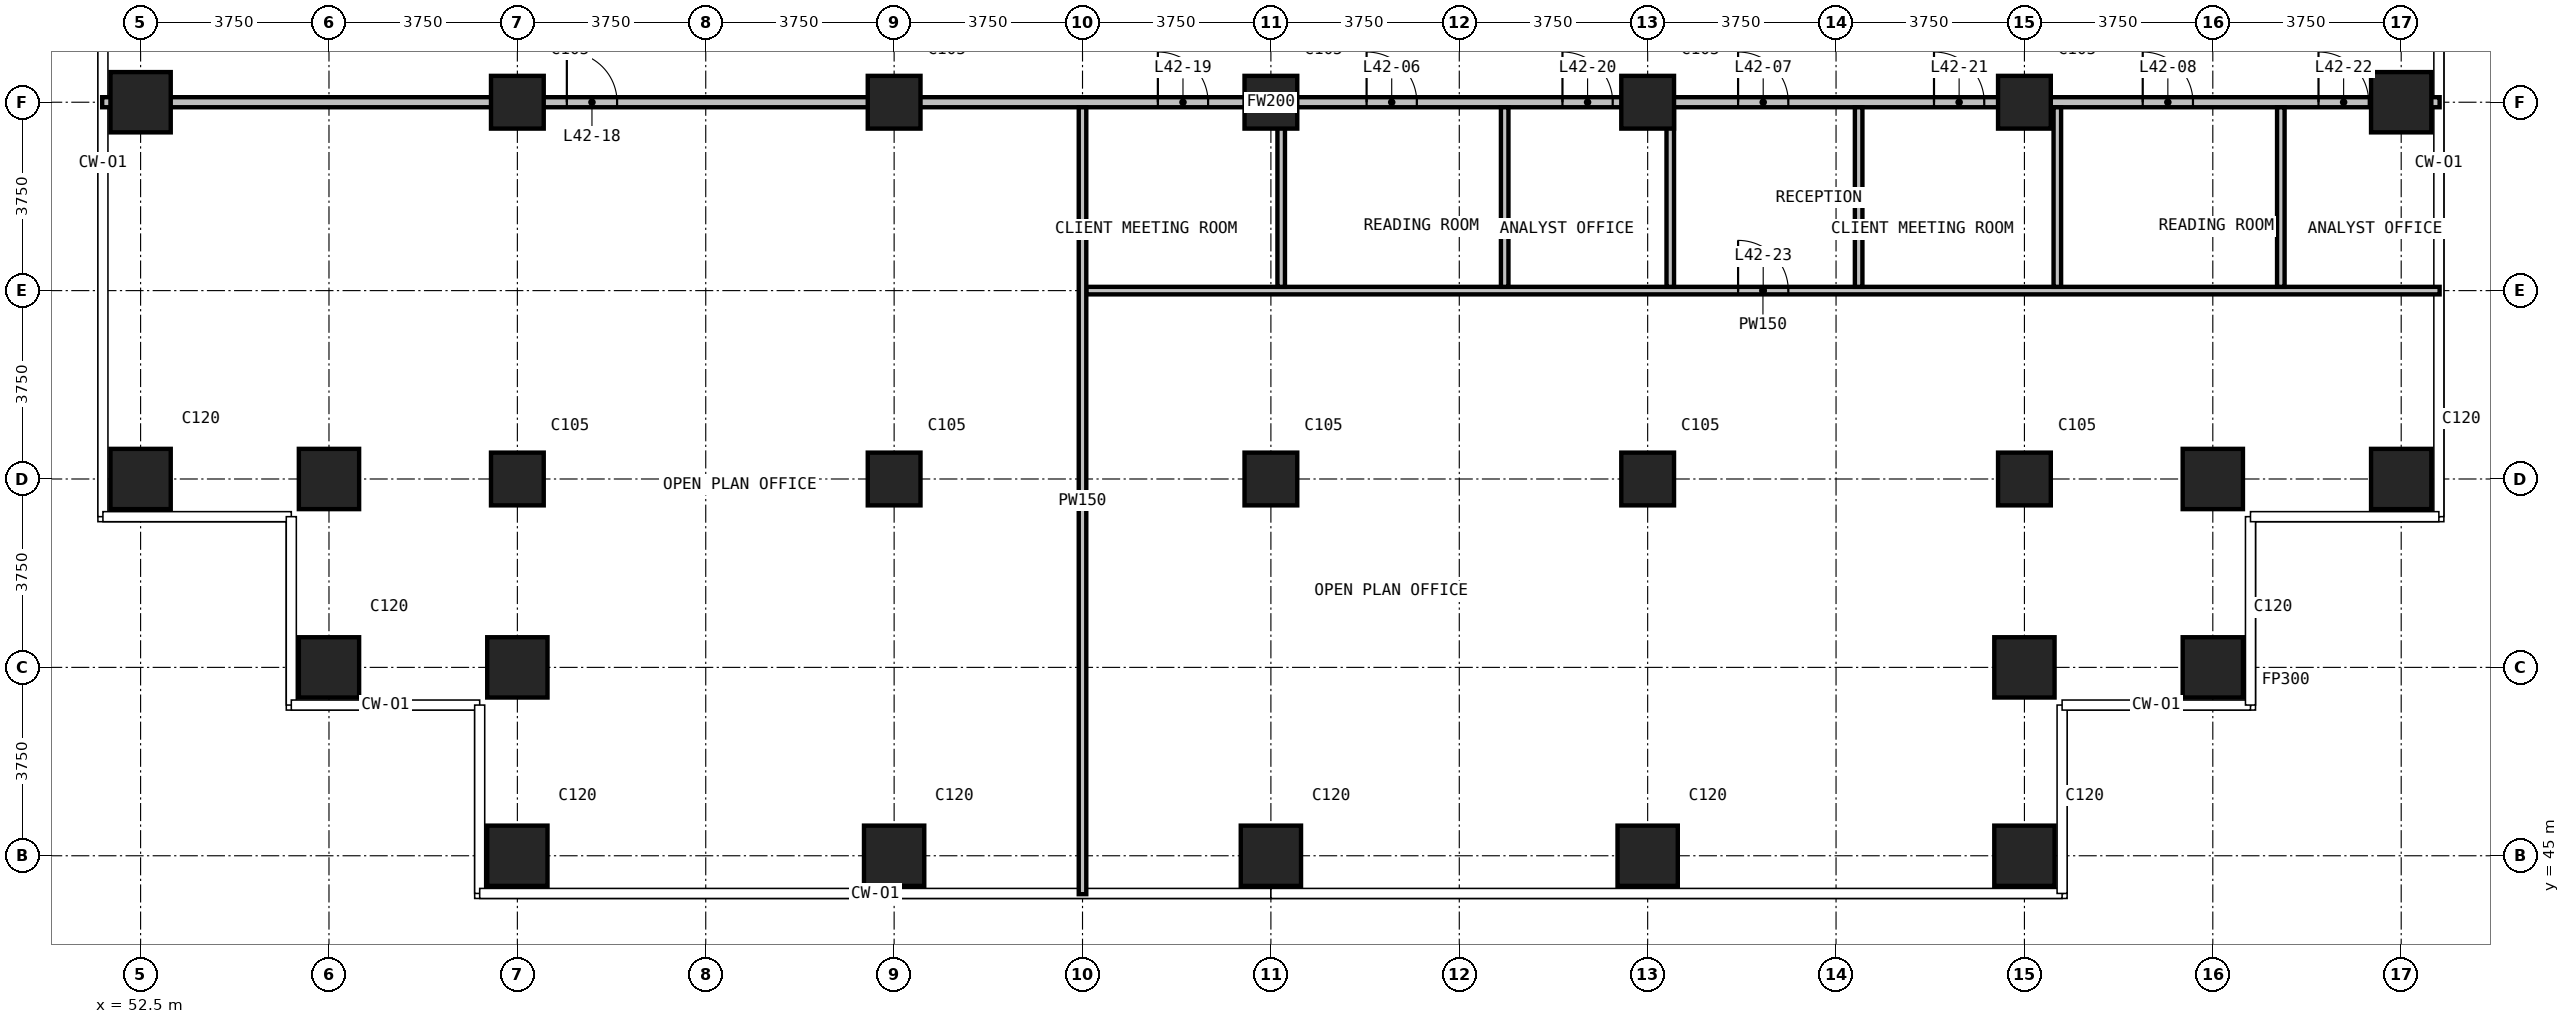
"""IFC4 building model, lengths in metres.
Left out: names, types, materials, properties, quantities, classifications, styles, units other than length and angle.
Written with IfcOpenShell. Run it as: python <this file> out.ifc"""

import sys

from ifc_helpers import new_model, si_unit, direction, frame, frame_2d, origin, origin_2d, place, context, subcontext, project, spatial, rectangle, extrude, element, fill, save


model = new_model("IFC4")
c1 = context("Model", 3, precision=1e-05, world=origin(), true_north=direction((0.0, 1.0)))
c2 = subcontext(c1, "Body", "Model", "MODEL_VIEW")
j1 = project(units=[si_unit("LENGTHUNIT", "METRE"), si_unit("PLANEANGLEUNIT", "RADIAN")], contexts=[c1])
p1 = place(None, origin())
s1 = spatial("IfcSite", under=j1, at=p1, CompositionType="ELEMENT")
p2 = place(p1, origin())
s2 = spatial("IfcBuilding", under=s1, at=p2, CompositionType="ELEMENT")
p3 = place(p2, frame((0.0, 0.0, 165.7)))
s3 = spatial("IfcBuildingStorey", under=s2, at=p3, CompositionType="ELEMENT", Elevation=165.7)
for number, where, z_axis, x_axis in (
    (1, (52.5, 52.5, 0.0), (0.0, 0.0, 1.0), (1.0, 0.0, 0.0)),
    (2, (52.5, 60.0, 0.0), (0.0, 0.0, 1.0), (1.0, 0.0, 0.0)),
    (3, (56.25, 48.75, 0.0), (0.0, 0.0, 1.0), (1.0, 0.0, 0.0)),
    (4, (56.25, 52.5, 0.0), (0.0, 0.0, 1.0), (1.0, 0.0, 0.0)),
    (5, (60.0, 45.0, 0.0), (0.0, 0.0, 1.0), (1.0, 0.0, 0.0)),
    (6, (60.0, 48.75, 0.0), (0.0, 0.0, 1.0), (1.0, 0.0, 0.0)),
):
    element("IfcColumn", number, at=place(p3, frame(where, z_axis=z_axis, x_axis=x_axis)), inside=s3, PredefinedType="COLUMN", context=c2, shape_type="SweptSolid", body=[
        extrude(rectangle(XDim=1.2, YDim=1.2, at=origin_2d()), origin(), (0.0, 0.0, 1.0), 3.6),
    ])
for number, where, z_axis, x_axis in (
    (7, (60.0, 52.5, 0.0), (0.0, 0.0, 1.0), (1.0, 0.0, 0.0)),
    (8, (60.0, 60.0, 0.0), (0.0, 0.0, 1.0), (1.0, 0.0, 0.0)),
):
    element("IfcColumn", number, at=place(p3, frame(where, z_axis=z_axis, x_axis=x_axis)), inside=s3, PredefinedType="COLUMN", context=c2, shape_type="SweptSolid", body=[
        extrude(rectangle(XDim=1.05, YDim=1.05, at=origin_2d()), origin(), (0.0, 0.0, 1.0), 3.6),
    ])
p4 = place(p3, frame((67.5, 45.0, 0.0), z_axis=(0.0, 0.0, 1.0), x_axis=(1.0, 0.0, 0.0)))
e9 = element("IfcColumn", 9, at=p4, inside=s3, PredefinedType="COLUMN", context=c2, shape_type="SweptSolid", body=[
    extrude(rectangle(XDim=1.2, YDim=1.2, at=origin_2d()), origin(), (0.0, 0.0, 1.0), 3.6),
])
for number, where, z_axis, x_axis in (
    (10, (67.5, 52.5, 0.0), (0.0, 0.0, 1.0), (1.0, 0.0, 0.0)),
    (11, (67.5, 60.0, 0.0), (0.0, 0.0, 1.0), (1.0, 0.0, 0.0)),
):
    element("IfcColumn", number, at=place(p3, frame(where, z_axis=z_axis, x_axis=x_axis)), inside=s3, PredefinedType="COLUMN", context=c2, shape_type="SweptSolid", body=[
        extrude(rectangle(XDim=1.05, YDim=1.05, at=origin_2d()), origin(), (0.0, 0.0, 1.0), 3.6),
    ])
p5 = place(p3, frame((75.0, 45.0, 0.0), z_axis=(0.0, 0.0, 1.0), x_axis=(1.0, 0.0, 0.0)))
e12 = element("IfcColumn", 12, at=p5, inside=s3, PredefinedType="COLUMN", context=c2, shape_type="SweptSolid", body=[
    extrude(rectangle(XDim=1.2, YDim=1.2, at=origin_2d()), origin(), (0.0, 0.0, 1.0), 3.6),
])
for number, where, z_axis, x_axis in (
    (13, (75.0, 52.5, 0.0), (0.0, 0.0, 1.0), (1.0, 0.0, 0.0)),
    (14, (75.0, 60.0, 0.0), (0.0, 0.0, 1.0), (1.0, 0.0, 0.0)),
):
    element("IfcColumn", number, at=place(p3, frame(where, z_axis=z_axis, x_axis=x_axis)), inside=s3, PredefinedType="COLUMN", context=c2, shape_type="SweptSolid", body=[
        extrude(rectangle(XDim=1.05, YDim=1.05, at=origin_2d()), origin(), (0.0, 0.0, 1.0), 3.6),
    ])
p6 = place(p3, frame((82.5, 45.0, 0.0), z_axis=(0.0, 0.0, 1.0), x_axis=(1.0, 0.0, 0.0)))
e15 = element("IfcColumn", 15, at=p6, inside=s3, PredefinedType="COLUMN", context=c2, shape_type="SweptSolid", body=[
    extrude(rectangle(XDim=1.2, YDim=1.2, at=origin_2d()), origin(), (0.0, 0.0, 1.0), 3.6),
])
for number, where, z_axis, x_axis in (
    (16, (82.5, 52.5, 0.0), (0.0, 0.0, 1.0), (1.0, 0.0, 0.0)),
    (17, (82.5, 60.0, 0.0), (0.0, 0.0, 1.0), (1.0, 0.0, 0.0)),
):
    element("IfcColumn", number, at=place(p3, frame(where, z_axis=z_axis, x_axis=x_axis)), inside=s3, PredefinedType="COLUMN", context=c2, shape_type="SweptSolid", body=[
        extrude(rectangle(XDim=1.05, YDim=1.05, at=origin_2d()), origin(), (0.0, 0.0, 1.0), 3.6),
    ])
for number, where, z_axis, x_axis in (
    (18, (90.0, 45.0, 0.0), (0.0, 0.0, 1.0), (1.0, 0.0, 0.0)),
    (19, (90.0, 48.75, 0.0), (0.0, 0.0, 1.0), (1.0, 0.0, 0.0)),
):
    element("IfcColumn", number, at=place(p3, frame(where, z_axis=z_axis, x_axis=x_axis)), inside=s3, PredefinedType="COLUMN", context=c2, shape_type="SweptSolid", body=[
        extrude(rectangle(XDim=1.2, YDim=1.2, at=origin_2d()), origin(), (0.0, 0.0, 1.0), 3.6),
    ])
for number, where, z_axis, x_axis in (
    (20, (90.0, 52.5, 0.0), (0.0, 0.0, 1.0), (1.0, 0.0, 0.0)),
    (21, (90.0, 60.0, 0.0), (0.0, 0.0, 1.0), (1.0, 0.0, 0.0)),
):
    element("IfcColumn", number, at=place(p3, frame(where, z_axis=z_axis, x_axis=x_axis)), inside=s3, PredefinedType="COLUMN", context=c2, shape_type="SweptSolid", body=[
        extrude(rectangle(XDim=1.05, YDim=1.05, at=origin_2d()), origin(), (0.0, 0.0, 1.0), 3.6),
    ])
for number, where, z_axis, x_axis in (
    (22, (93.75, 48.75, 0.0), (0.0, 0.0, 1.0), (1.0, 0.0, 0.0)),
    (23, (93.75, 52.5, 0.0), (0.0, 0.0, 1.0), (1.0, 0.0, 0.0)),
    (24, (97.5, 52.5, 0.0), (0.0, 0.0, 1.0), (1.0, 0.0, 0.0)),
    (25, (97.5, 60.0, 0.0), (0.0, 0.0, 1.0), (1.0, 0.0, 0.0)),
):
    element("IfcColumn", number, at=place(p3, frame(where, z_axis=z_axis, x_axis=x_axis)), inside=s3, PredefinedType="COLUMN", context=c2, shape_type="SweptSolid", body=[
        extrude(rectangle(XDim=1.2, YDim=1.2, at=origin_2d()), origin(), (0.0, 0.0, 1.0), 3.6),
    ])
p7 = place(p3, frame((51.735, 60.0, 0.0), z_axis=(0.0, 0.0, 1.0), x_axis=(1.0, 0.0, 0.0)))
e26 = element("IfcWall", 26, at=p7, inside=s3, PredefinedType="PARTITIONING", context=c2, shape_type="SweptSolid", body=[
    extrude(rectangle(XDim=46.53, YDim=0.2, at=frame_2d((23.265, 0.0))), origin(), (0.0, 0.0, 1.0), 3.3),
])
p8 = place(p7, frame((25.17, 0.0, 0.0)))
e27 = element("IfcOpeningElement", 27, at=p8, cuts=e26, PredefinedType="OPENING", context=c2, shape_type="SweptSolid", body=[
    extrude(rectangle(XDim=1.0, YDim=2.2, at=frame_2d((0.5, 1.1))), frame((0.0, 0.11, 0.0), z_axis=(0.0, -1.0, 0.0), x_axis=(1.0, 0.0, 0.0)), (0.0, 0.0, 1.0), 0.22),
])
p9 = place(p7, frame((32.565, 0.0, 0.0)))
e28 = element("IfcOpeningElement", 28, at=p9, cuts=e26, PredefinedType="OPENING", context=c2, shape_type="SweptSolid", body=[
    extrude(rectangle(XDim=1.0, YDim=2.2, at=frame_2d((0.5, 1.1))), frame((0.0, 0.11, 0.0), z_axis=(0.0, -1.0, 0.0), x_axis=(1.0, 0.0, 0.0)), (0.0, 0.0, 1.0), 0.22),
])
p10 = place(p7, frame((40.62, 0.0, 0.0)))
e29 = element("IfcOpeningElement", 29, at=p10, cuts=e26, PredefinedType="OPENING", context=c2, shape_type="SweptSolid", body=[
    extrude(rectangle(XDim=1.0, YDim=2.2, at=frame_2d((0.5, 1.1))), frame((0.0, 0.11, 0.0), z_axis=(0.0, -1.0, 0.0), x_axis=(1.0, 0.0, 0.0)), (0.0, 0.0, 1.0), 0.22),
])
p11 = place(p7, frame((9.25, 0.0, 0.0)))
e30 = element("IfcOpeningElement", 30, at=p11, cuts=e26, PredefinedType="OPENING", context=c2, shape_type="SweptSolid", body=[
    extrude(rectangle(XDim=1.0, YDim=2.2, at=frame_2d((0.5, 1.1))), frame((0.0, 0.11, 0.0), z_axis=(0.0, -1.0, 0.0), x_axis=(1.0, 0.0, 0.0)), (0.0, 0.0, 1.0), 0.22),
])
p12 = place(p7, frame((21.015, 0.0, 0.0)))
e31 = element("IfcOpeningElement", 31, at=p12, cuts=e26, PredefinedType="OPENING", context=c2, shape_type="SweptSolid", body=[
    extrude(rectangle(XDim=1.0, YDim=2.2, at=frame_2d((0.5, 1.1))), frame((0.0, 0.11, 0.0), z_axis=(0.0, -1.0, 0.0), x_axis=(1.0, 0.0, 0.0)), (0.0, 0.0, 1.0), 0.22),
])
p13 = place(p7, frame((29.069, 0.0, 0.0)))
e32 = element("IfcOpeningElement", 32, at=p13, cuts=e26, PredefinedType="OPENING", context=c2, shape_type="SweptSolid", body=[
    extrude(rectangle(XDim=1.0, YDim=2.2, at=frame_2d((0.5, 1.1))), frame((0.0, 0.11, 0.0), z_axis=(0.0, -1.0, 0.0), x_axis=(1.0, 0.0, 0.0)), (0.0, 0.0, 1.0), 0.22),
])
p14 = place(p7, frame((36.465, 0.0, 0.0)))
e33 = element("IfcOpeningElement", 33, at=p14, cuts=e26, PredefinedType="OPENING", context=c2, shape_type="SweptSolid", body=[
    extrude(rectangle(XDim=1.0, YDim=2.2, at=frame_2d((0.5, 1.1))), frame((0.0, 0.11, 0.0), z_axis=(0.0, -1.0, 0.0), x_axis=(1.0, 0.0, 0.0)), (0.0, 0.0, 1.0), 0.22),
])
p15 = place(p7, frame((44.119, 0.0, 0.0)))
e34 = element("IfcOpeningElement", 34, at=p15, cuts=e26, PredefinedType="OPENING", context=c2, shape_type="SweptSolid", body=[
    extrude(rectangle(XDim=1.0, YDim=2.2, at=frame_2d((0.5, 1.1))), frame((0.0, 0.11, 0.0), z_axis=(0.0, -1.0, 0.0), x_axis=(1.0, 0.0, 0.0)), (0.0, 0.0, 1.0), 0.22),
])
p16 = place(p3, frame((71.325, 56.25, 0.0), z_axis=(0.0, 0.0, 1.0), x_axis=(1.0, 0.0, 0.0)))
e35 = element("IfcWall", 35, at=p16, inside=s3, PredefinedType="PARTITIONING", context=c2, shape_type="SweptSolid", body=[
    extrude(rectangle(XDim=26.94, YDim=0.15, at=frame_2d((13.47, 0.0))), origin(), (0.0, 0.0, 1.0), 3.3),
])
p17 = place(p16, frame((12.975, 0.0, 0.0)))
e36 = element("IfcOpeningElement", 36, at=p17, cuts=e35, PredefinedType="OPENING", context=c2, shape_type="SweptSolid", body=[
    extrude(rectangle(XDim=1.0, YDim=2.2, at=frame_2d((0.5, 1.1))), frame((0.0, 0.085, 0.0), z_axis=(0.0, -1.0, 0.0), x_axis=(1.0, 0.0, 0.0)), (0.0, 0.0, 1.0), 0.17),
])
p18 = place(p3, frame((71.25, 44.235, 0.0), z_axis=(0.0, 0.0, 1.0), x_axis=(0.0, 1.0, 0.0)))
e37 = element("IfcWall", 37, at=p18, inside=s3, PredefinedType="PARTITIONING", context=c2, shape_type="SweptSolid", body=[
    extrude(rectangle(XDim=15.665, YDim=0.15, at=frame_2d((7.833, 0.0))), origin(), (0.0, 0.0, 1.0), 3.3),
])
for number, where, z_axis, x_axis in (
    (38, (75.205, 56.325, 0.0), (0.0, 0.0, 1.0), (0.0, 1.0, 0.0)),
    (39, (79.654, 56.325, 0.0), (0.0, 0.0, 1.0), (0.0, 1.0, 0.0)),
    (40, (82.95, 56.325, 0.0), (0.0, 0.0, 1.0), (0.0, 1.0, 0.0)),
    (41, (86.7, 56.325, 0.0), (0.0, 0.0, 1.0), (0.0, 1.0, 0.0)),
    (42, (90.655, 56.325, 0.0), (0.0, 0.0, 1.0), (0.0, 1.0, 0.0)),
    (43, (95.104, 56.325, 0.0), (0.0, 0.0, 1.0), (0.0, 1.0, 0.0)),
):
    element("IfcWall", number, at=place(p3, frame(where, z_axis=z_axis, x_axis=x_axis)), inside=s3, PredefinedType="PARTITIONING", context=c2, shape_type="SweptSolid", body=[
        extrude(rectangle(XDim=3.575, YDim=0.15, at=frame_2d((1.788, 0.0))), origin(), (0.0, 0.0, 1.0), 3.3),
    ])
p19 = place(p8, origin())
e44 = element("IfcDoor", 44, at=p19, inside=s3, OperationType="SINGLE_SWING_LEFT", PredefinedType="DOOR", context=c2, shape_type="SweptSolid", body=[
    extrude(rectangle(XDim=1.0, YDim=2.2, at=frame_2d((0.5, 1.1))), frame((0.0, 0.025, 0.0), z_axis=(0.0, -1.0, 0.0), x_axis=(1.0, 0.0, 0.0)), (0.0, 0.0, 1.0), 0.05),
])
fill(e27, e44)
p20 = place(p9, origin())
e45 = element("IfcDoor", 45, at=p20, inside=s3, OperationType="SINGLE_SWING_LEFT", PredefinedType="DOOR", context=c2, shape_type="SweptSolid", body=[
    extrude(rectangle(XDim=1.0, YDim=2.2, at=frame_2d((0.5, 1.1))), frame((0.0, 0.025, 0.0), z_axis=(0.0, -1.0, 0.0), x_axis=(1.0, 0.0, 0.0)), (0.0, 0.0, 1.0), 0.05),
])
fill(e28, e45)
p21 = place(p10, origin())
e46 = element("IfcDoor", 46, at=p21, inside=s3, OperationType="SINGLE_SWING_LEFT", PredefinedType="DOOR", context=c2, shape_type="SweptSolid", body=[
    extrude(rectangle(XDim=1.0, YDim=2.2, at=frame_2d((0.5, 1.1))), frame((0.0, 0.025, 0.0), z_axis=(0.0, -1.0, 0.0), x_axis=(1.0, 0.0, 0.0)), (0.0, 0.0, 1.0), 0.05),
])
fill(e29, e46)
p22 = place(p11, origin())
e47 = element("IfcDoor", 47, at=p22, inside=s3, OperationType="SINGLE_SWING_LEFT", PredefinedType="DOOR", context=c2, shape_type="SweptSolid", body=[
    extrude(rectangle(XDim=1.0, YDim=2.2, at=frame_2d((0.5, 1.1))), frame((0.0, 0.025, 0.0), z_axis=(0.0, -1.0, 0.0), x_axis=(1.0, 0.0, 0.0)), (0.0, 0.0, 1.0), 0.05),
])
fill(e30, e47)
p23 = place(p12, origin())
e48 = element("IfcDoor", 48, at=p23, inside=s3, OperationType="SINGLE_SWING_LEFT", PredefinedType="DOOR", context=c2, shape_type="SweptSolid", body=[
    extrude(rectangle(XDim=1.0, YDim=2.2, at=frame_2d((0.5, 1.1))), frame((0.0, 0.025, 0.0), z_axis=(0.0, -1.0, 0.0), x_axis=(1.0, 0.0, 0.0)), (0.0, 0.0, 1.0), 0.05),
])
fill(e31, e48)
p24 = place(p13, origin())
e49 = element("IfcDoor", 49, at=p24, inside=s3, OperationType="SINGLE_SWING_RIGHT", PredefinedType="DOOR", context=c2, shape_type="SweptSolid", body=[
    extrude(rectangle(XDim=1.0, YDim=2.2, at=frame_2d((0.5, 1.1))), frame((0.0, 0.025, 0.0), z_axis=(0.0, -1.0, 0.0), x_axis=(1.0, 0.0, 0.0)), (0.0, 0.0, 1.0), 0.05),
])
fill(e32, e49)
p25 = place(p14, origin())
e50 = element("IfcDoor", 50, at=p25, inside=s3, OperationType="SINGLE_SWING_LEFT", PredefinedType="DOOR", context=c2, shape_type="SweptSolid", body=[
    extrude(rectangle(XDim=1.0, YDim=2.2, at=frame_2d((0.5, 1.1))), frame((0.0, 0.025, 0.0), z_axis=(0.0, -1.0, 0.0), x_axis=(1.0, 0.0, 0.0)), (0.0, 0.0, 1.0), 0.05),
])
fill(e33, e50)
p26 = place(p15, origin())
e51 = element("IfcDoor", 51, at=p26, inside=s3, OperationType="SINGLE_SWING_LEFT", PredefinedType="DOOR", context=c2, shape_type="SweptSolid", body=[
    extrude(rectangle(XDim=1.0, YDim=2.2, at=frame_2d((0.5, 1.1))), frame((0.0, 0.025, 0.0), z_axis=(0.0, -1.0, 0.0), x_axis=(1.0, 0.0, 0.0)), (0.0, 0.0, 1.0), 0.05),
])
fill(e34, e51)
p27 = place(p17, origin())
e52 = element("IfcDoor", 52, at=p27, inside=s3, OperationType="SINGLE_SWING_LEFT", PredefinedType="DOOR", context=c2, shape_type="SweptSolid", body=[
    extrude(rectangle(XDim=1.0, YDim=2.2, at=frame_2d((0.5, 1.1))), frame((0.0, 0.025, 0.0), z_axis=(0.0, -1.0, 0.0), x_axis=(1.0, 0.0, 0.0)), (0.0, 0.0, 1.0), 0.05),
])
fill(e36, e52)
save(model, sys.argv[1])
